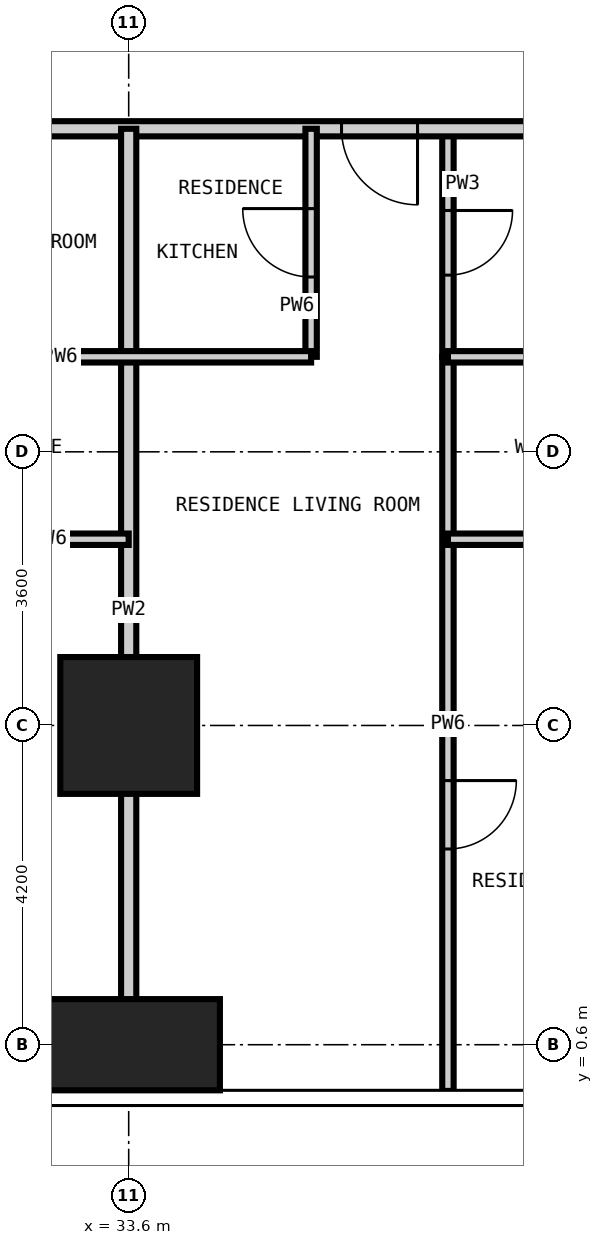
"""IFC4 building model, lengths in metres.
Left out: names, types, materials, properties, quantities, classifications, styles, units other than length and angle.
Written with IfcOpenShell. Run it as: python <this file> out.ifc"""

import sys

from ifc_helpers import new_model, si_unit, direction, frame, frame_2d, origin, origin_2d, place, context, subcontext, project, spatial, rectangle, extrude, element, fill, save


model = new_model("IFC4")
c1 = context("Model", 3, precision=1e-05, world=origin(), true_north=direction((0.0, 1.0)))
c2 = subcontext(c1, "Body", "Model", "MODEL_VIEW")
j1 = project(units=[si_unit("LENGTHUNIT", "METRE"), si_unit("PLANEANGLEUNIT", "RADIAN")], contexts=[c1])
p1 = place(None, origin())
s1 = spatial("IfcSite", under=j1, at=p1, CompositionType="ELEMENT")
p2 = place(p1, origin())
s2 = spatial("IfcBuilding", under=s1, at=p2, CompositionType="ELEMENT")
p3 = place(p2, frame((0.0, 0.0, 52.2)))
s3 = spatial("IfcBuildingStorey", under=s2, at=p3, CompositionType="ELEMENT", Elevation=52.2)
p4 = place(p3, frame((33.6, 0.6, -0.35), z_axis=(0.0, 0.0, 1.0), x_axis=(1.0, 0.0, 0.0)))
e1 = element("IfcColumn", 1, at=p4, inside=s3, PredefinedType="COLUMN", context=c2, shape_type="SweptSolid", body=[
    extrude(rectangle(XDim=2.4, YDim=1.2, at=origin_2d()), origin(), (0.0, 0.0, 1.0), 3.6),
])
p5 = place(p3, frame((33.6, 4.8, -0.35), z_axis=(0.0, 0.0, 1.0), x_axis=(1.0, 0.0, 0.0)))
e2 = element("IfcColumn", 2, at=p5, inside=s3, PredefinedType="COLUMN", context=c2, shape_type="SweptSolid", body=[
    extrude(rectangle(XDim=1.8, YDim=1.8, at=origin_2d()), origin(), (0.0, 0.0, 1.0), 3.6),
])
p6 = place(p3, frame((37.8, 9.65, 0.0), z_axis=(0.0, 0.0, 1.0), x_axis=(0.0, 1.0, 0.0)))
e3 = element("IfcWall", 3, at=p6, inside=s3, PredefinedType="PARTITIONING", context=c2, shape_type="SweptSolid", body=[
    extrude(rectangle(XDim=3.0, YDim=0.15, at=frame_2d((1.5, 0.0))), origin(), (0.0, 0.0, 1.0), 3.25),
])
p7 = place(p6, frame((1.075, 0.0, 0.0)))
e4 = element("IfcOpeningElement", 4, at=p7, cuts=e3, PredefinedType="OPENING", context=c2, shape_type="SweptSolid", body=[
    extrude(rectangle(XDim=0.85, YDim=2.1, at=frame_2d((0.425, 1.05))), frame((0.0, 0.085, 0.0), z_axis=(0.0, -1.0, 0.0), x_axis=(1.0, 0.0, 0.0)), (0.0, 0.0, 1.0), 0.17),
])
p8 = place(p3, frame((44.95, 12.65, 0.0), z_axis=(0.0, 0.0, 1.0), x_axis=(-1.0, 0.0, 0.0)))
e5 = element("IfcWall", 5, at=p8, inside=s3, PredefinedType="PARTITIONING", context=c2, shape_type="SweptSolid", body=[
    extrude(rectangle(XDim=32.3, YDim=0.2, at=frame_2d((16.15, 0.0))), origin(), (0.0, 0.0, 1.0), 3.25),
])
p9 = place(p8, frame((24.35, 0.0, 0.0)))
e6 = element("IfcOpeningElement", 6, at=p9, cuts=e5, PredefinedType="OPENING", context=c2, shape_type="SweptSolid", body=[
    extrude(rectangle(XDim=1.0, YDim=2.2, at=frame_2d((0.5, 1.1))), frame((0.0, 0.11, 0.0), z_axis=(0.0, -1.0, 0.0), x_axis=(1.0, 0.0, 0.0)), (0.0, 0.0, 1.0), 0.22),
])
p10 = place(p8, frame((15.95, 0.0, 0.0)))
e7 = element("IfcOpeningElement", 7, at=p10, cuts=e5, PredefinedType="OPENING", context=c2, shape_type="SweptSolid", body=[
    extrude(rectangle(XDim=1.0, YDim=2.2, at=frame_2d((0.5, 1.1))), frame((0.0, 0.11, 0.0), z_axis=(0.0, -1.0, 0.0), x_axis=(1.0, 0.0, 0.0)), (0.0, 0.0, 1.0), 0.22),
])
p11 = place(p8, frame((7.55, 0.0, 0.0)))
e8 = element("IfcOpeningElement", 8, at=p11, cuts=e5, PredefinedType="OPENING", context=c2, shape_type="SweptSolid", body=[
    extrude(rectangle(XDim=1.0, YDim=2.2, at=frame_2d((0.5, 1.1))), frame((0.0, 0.11, 0.0), z_axis=(0.0, -1.0, 0.0), x_axis=(1.0, 0.0, 0.0)), (0.0, 0.0, 1.0), 0.22),
])
p12 = place(p3, frame((33.6, -0.008, 0.0), z_axis=(0.0, 0.0, 1.0), x_axis=(0.0, 1.0, 0.0)))
e9 = element("IfcWall", 9, at=p12, inside=s3, PredefinedType="PARTITIONING", context=c2, shape_type="SweptSolid", body=[
    extrude(rectangle(XDim=12.658, YDim=0.2, at=frame_2d((6.329, 0.0))), origin(), (0.0, 0.0, 1.0), 3.25),
])
p13 = place(p3, frame((36.0, 9.65, 0.0), z_axis=(0.0, 0.0, 1.0), x_axis=(0.0, 1.0, 0.0)))
e10 = element("IfcWall", 10, at=p13, inside=s3, PredefinedType="PARTITIONING", context=c2, shape_type="SweptSolid", body=[
    extrude(rectangle(XDim=3.0, YDim=0.15, at=frame_2d((1.5, 0.0))), origin(), (0.0, 0.0, 1.0), 3.25),
])
p14 = place(p13, frame((1.05, 0.0, 0.0)))
e11 = element("IfcOpeningElement", 11, at=p14, cuts=e10, PredefinedType="OPENING", context=c2, shape_type="SweptSolid", body=[
    extrude(rectangle(XDim=0.9, YDim=2.1, at=frame_2d((0.45, 1.05))), frame((0.0, 0.085, 0.0), z_axis=(0.0, -1.0, 0.0), x_axis=(1.0, 0.0, 0.0)), (0.0, 0.0, 1.0), 0.17),
])
p15 = place(p3, frame((37.8, -0.008, 0.0), z_axis=(0.0, 0.0, 1.0), x_axis=(0.0, 1.0, 0.0)))
e12 = element("IfcWall", 12, at=p15, inside=s3, PredefinedType="PARTITIONING", context=c2, shape_type="SweptSolid", body=[
    extrude(rectangle(XDim=9.658, YDim=0.15, at=frame_2d((4.829, 0.0))), origin(), (0.0, 0.0, 1.0), 3.25),
])
p16 = place(p15, frame((3.183, 0.0, 0.0)))
e13 = element("IfcOpeningElement", 13, at=p16, cuts=e12, PredefinedType="OPENING", context=c2, shape_type="SweptSolid", body=[
    extrude(rectangle(XDim=0.9, YDim=2.1, at=frame_2d((0.45, 1.05))), frame((0.0, 0.085, 0.0), z_axis=(0.0, -1.0, 0.0), x_axis=(1.0, 0.0, 0.0)), (0.0, 0.0, 1.0), 0.17),
])
p17 = place(p3, frame((29.4, 7.25, 0.0), z_axis=(0.0, 0.0, 1.0), x_axis=(1.0, 0.0, 0.0)))
e14 = element("IfcWall", 14, at=p17, inside=s3, PredefinedType="PARTITIONING", context=c2, shape_type="SweptSolid", body=[
    extrude(rectangle(XDim=4.2, YDim=0.15, at=frame_2d((2.1, 0.0))), origin(), (0.0, 0.0, 1.0), 3.25),
])
p18 = place(p17, frame((1.65, 0.0, 0.0)))
e15 = element("IfcOpeningElement", 15, at=p18, cuts=e14, PredefinedType="OPENING", context=c2, shape_type="SweptSolid", body=[
    extrude(rectangle(XDim=0.9, YDim=2.1, at=frame_2d((0.45, 1.05))), frame((0.0, 0.085, 0.0), z_axis=(0.0, -1.0, 0.0), x_axis=(1.0, 0.0, 0.0)), (0.0, 0.0, 1.0), 0.17),
])
p19 = place(p3, frame((37.8, 7.25, 0.0), z_axis=(0.0, 0.0, 1.0), x_axis=(1.0, 0.0, 0.0)))
e16 = element("IfcWall", 16, at=p19, inside=s3, PredefinedType="PARTITIONING", context=c2, shape_type="SweptSolid", body=[
    extrude(rectangle(XDim=4.2, YDim=0.15, at=frame_2d((2.1, 0.0))), origin(), (0.0, 0.0, 1.0), 3.25),
])
p20 = place(p19, frame((1.65, 0.0, 0.0)))
e17 = element("IfcOpeningElement", 17, at=p20, cuts=e16, PredefinedType="OPENING", context=c2, shape_type="SweptSolid", body=[
    extrude(rectangle(XDim=0.9, YDim=2.1, at=frame_2d((0.45, 1.05))), frame((0.0, 0.085, 0.0), z_axis=(0.0, -1.0, 0.0), x_axis=(1.0, 0.0, 0.0)), (0.0, 0.0, 1.0), 0.17),
])
p21 = place(p3, frame((29.4, 9.65, 0.0), z_axis=(0.0, 0.0, 1.0), x_axis=(1.0, 0.0, 0.0)))
e18 = element("IfcWall", 18, at=p21, inside=s3, PredefinedType="PARTITIONING", context=c2, shape_type="SweptSolid", body=[
    extrude(rectangle(XDim=6.6, YDim=0.15, at=frame_2d((3.3, 0.0))), origin(), (0.0, 0.0, 1.0), 3.25),
])
p22 = place(p3, frame((37.8, 9.65, 0.0), z_axis=(0.0, 0.0, 1.0), x_axis=(1.0, 0.0, 0.0)))
e19 = element("IfcWall", 19, at=p22, inside=s3, PredefinedType="PARTITIONING", context=c2, shape_type="SweptSolid", body=[
    extrude(rectangle(XDim=4.2, YDim=0.15, at=frame_2d((2.1, 0.0))), origin(), (0.0, 0.0, 1.0), 3.25),
])
p23 = place(p11, origin())
e20 = element("IfcDoor", 20, at=p23, inside=s3, OperationType="SINGLE_SWING_LEFT", PredefinedType="DOOR", context=c2, shape_type="SweptSolid", body=[
    extrude(rectangle(XDim=1.0, YDim=2.2, at=frame_2d((0.5, 1.1))), frame((0.0, 0.025, 0.0), z_axis=(0.0, -1.0, 0.0), x_axis=(1.0, 0.0, 0.0)), (0.0, 0.0, 1.0), 0.05),
])
fill(e8, e20)
p24 = place(p14, origin())
e21 = element("IfcDoor", 21, at=p24, inside=s3, OperationType="SINGLE_SWING_RIGHT", PredefinedType="DOOR", context=c2, shape_type="SweptSolid", body=[
    extrude(rectangle(XDim=0.9, YDim=2.1, at=frame_2d((0.45, 1.05))), frame((0.0, 0.025, 0.0), z_axis=(0.0, -1.0, 0.0), x_axis=(1.0, 0.0, 0.0)), (0.0, 0.0, 1.0), 0.05),
])
fill(e11, e21)
p25 = place(p7, frame((0.85, 0.0, 0.0), z_axis=(0.0, 0.0, 1.0), x_axis=(-1.0, 0.0, 0.0)))
e22 = element("IfcDoor", 22, at=p25, inside=s3, OperationType="SINGLE_SWING_LEFT", PredefinedType="DOOR", context=c2, shape_type="SweptSolid", body=[
    extrude(rectangle(XDim=0.85, YDim=2.1, at=frame_2d((0.425, 1.05))), frame((0.0, 0.025, 0.0), z_axis=(0.0, -1.0, 0.0), x_axis=(1.0, 0.0, 0.0)), (0.0, 0.0, 1.0), 0.05),
])
fill(e4, e22)
p26 = place(p16, frame((0.9, 0.0, 0.0), z_axis=(0.0, 0.0, 1.0), x_axis=(-1.0, 0.0, 0.0)))
e23 = element("IfcDoor", 23, at=p26, inside=s3, OperationType="SINGLE_SWING_LEFT", PredefinedType="DOOR", context=c2, shape_type="SweptSolid", body=[
    extrude(rectangle(XDim=0.9, YDim=2.1, at=frame_2d((0.45, 1.05))), frame((0.0, 0.025, 0.0), z_axis=(0.0, -1.0, 0.0), x_axis=(1.0, 0.0, 0.0)), (0.0, 0.0, 1.0), 0.05),
])
fill(e13, e23)
save(model, sys.argv[1])
